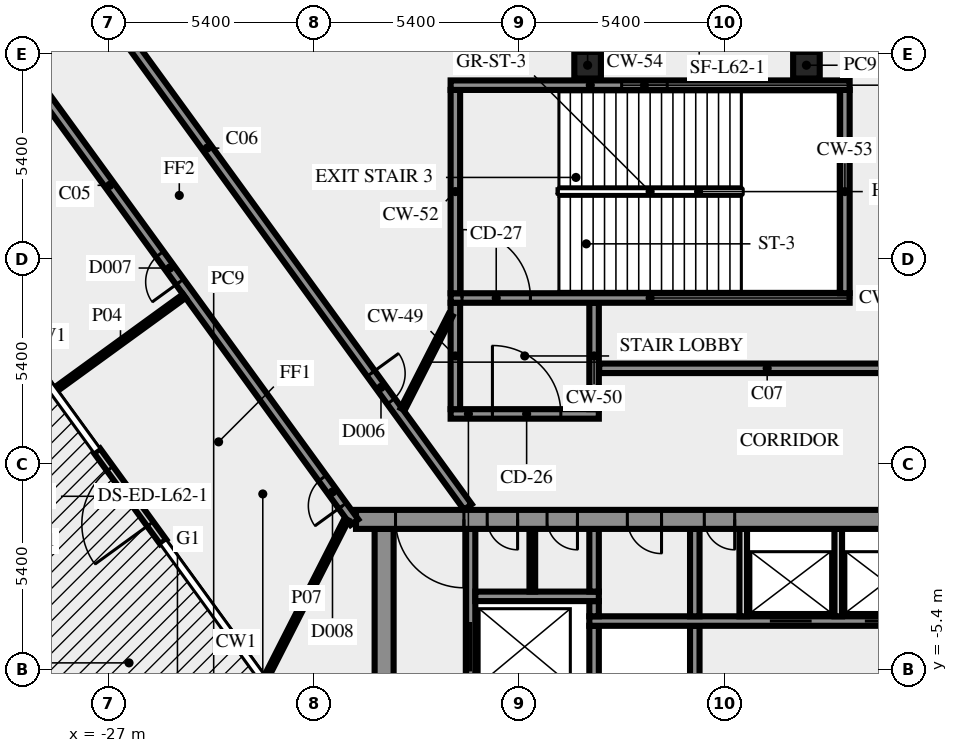
"""IFC4 building model, lengths in metres.
Left out: names, types, materials, properties, quantities, classifications, styles, units other than length and angle.
Written with IfcOpenShell. Run it as: python <this file> out.ifc"""

import sys

from ifc_helpers import new_model, si_unit, direction, frame, frame_2d, origin, origin_2d, place, context, subcontext, project, spatial, rectangle, extrude, element, fill, save


model = new_model("IFC4")
c1 = context("Model", 3, precision=1e-05, world=origin(), true_north=direction((0.0, 1.0)))
c2 = subcontext(c1, "Body", "Model", "MODEL_VIEW")
j1 = project(units=[si_unit("LENGTHUNIT", "METRE"), si_unit("PLANEANGLEUNIT", "RADIAN")], contexts=[c1])
p1 = place(None, origin())
s1 = spatial("IfcSite", under=j1, at=p1, CompositionType="ELEMENT")
p2 = place(p1, origin())
s2 = spatial("IfcBuilding", under=s1, at=p2, CompositionType="ELEMENT")
p3 = place(p2, frame((0.0, 0.0, 265.0)))
s3 = spatial("IfcBuildingStorey", under=s2, at=p3, CompositionType="ELEMENT", Elevation=265.0)
for number, where, z_axis, x_axis in (
    (1, (-8.637, 10.5, 0.0), (0.0, 0.0, 1.0), (-1.0, 0.0, 0.0)),
    (2, (-14.395, 10.5, 0.0), (0.0, 0.0, 1.0), (-1.0, 0.0, 0.0)),
):
    element("IfcColumn", number, at=place(p3, frame(where, z_axis=z_axis, x_axis=x_axis)), inside=s3, PredefinedType="COLUMN", context=c2, shape_type="SweptSolid", body=[
        extrude(rectangle(XDim=0.7, YDim=0.7, at=origin_2d()), origin(), (0.0, 0.0, 1.0), 3.65),
    ])
p4 = place(p3, frame((-25.563, -2.041, 0.0), z_axis=(0.0, 0.0, 1.0), x_axis=(-0.587774760134, 0.809024617271, 0.0)))
e3 = element("IfcWall", 3, at=p4, inside=s3, PredefinedType="SOLIDWALL", context=c2, shape_type="SweptSolid", body=[
    extrude(rectangle(XDim=2.963, YDim=0.2, at=frame_2d((1.481, 0.0))), origin(), (0.0, 0.0, 1.0), 3.65),
])
p5 = place(p4, frame((0.582, 0.0, 0.0)))
e4 = element("IfcOpeningElement", 4, at=p5, cuts=e3, PredefinedType="OPENING", context=c2, shape_type="SweptSolid", body=[
    extrude(rectangle(XDim=1.8, YDim=2.4, at=frame_2d((0.9, 1.2))), frame((0.0, 0.11, 0.0), z_axis=(0.0, -1.0, 0.0), x_axis=(1.0, 0.0, 0.0)), (0.0, 0.0, 1.0), 0.22),
])
p6 = place(p3, frame((-19.75, -10.5, 0.0), z_axis=(0.0, 0.0, 1.0), x_axis=(0.0, 1.0, 0.0)))
e5 = element("IfcWall", 5, at=p6, inside=s3, PredefinedType="SHEAR", context=c2, shape_type="SweptSolid", body=[
    extrude(rectangle(XDim=8.8, YDim=0.5, at=frame_2d((4.4, 0.0))), origin(), (0.0, 0.0, 1.0), 3.65),
])
p7 = place(p3, frame((-17.475, -6.0, 0.0), z_axis=(0.0, 0.0, 1.0), x_axis=(0.0, 1.0, 0.0)))
e6 = element("IfcWall", 6, at=p7, inside=s3, PredefinedType="SHEAR", context=c2, shape_type="SweptSolid", body=[
    extrude(rectangle(XDim=4.3, YDim=0.25, at=frame_2d((2.15, 0.0))), origin(), (0.0, 0.0, 1.0), 3.65),
])
p8 = place(p7, frame((0.55, 0.0, 0.0)))
e7 = element("IfcOpeningElement", 7, at=p8, cuts=e6, PredefinedType="OPENING", context=c2, shape_type="SweptSolid", body=[
    extrude(rectangle(XDim=1.3, YDim=2.1, at=frame_2d((0.65, 1.05))), frame((0.0, 0.135, 0.0), z_axis=(0.0, -1.0, 0.0), x_axis=(1.0, 0.0, 0.0)), (0.0, 0.0, 1.0), 0.27),
])
for number, where, z_axis, x_axis in (
    (8, (-14.225, -6.0, 0.0), (0.0, 0.0, 1.0), (0.0, 1.0, 0.0)),
    (9, (-11.575, -6.0, 0.0), (0.0, 0.0, 1.0), (0.0, 1.0, 0.0)),
):
    element("IfcWall", number, at=place(p3, frame(where, z_axis=z_axis, x_axis=x_axis)), inside=s3, PredefinedType="SHEAR", context=c2, shape_type="SweptSolid", body=[
        extrude(rectangle(XDim=1.75, YDim=0.25, at=frame_2d((0.875, 0.0))), origin(), (0.0, 0.0, 1.0), 3.65),
    ])
p9 = place(p3, frame((-14.35, -4.125, 0.0), z_axis=(0.0, 0.0, 1.0), x_axis=(1.0, 0.0, 0.0)))
e10 = element("IfcWall", 10, at=p9, inside=s3, PredefinedType="SHEAR", context=c2, shape_type="SweptSolid", body=[
    extrude(rectangle(XDim=12.7, YDim=0.25, at=frame_2d((6.35, 0.0))), origin(), (0.0, 0.0, 1.0), 3.65),
])
p10 = place(p9, frame((4.75, 0.0, 0.0)))
e11 = element("IfcOpeningElement", 11, at=p10, cuts=e10, PredefinedType="OPENING", context=c2, shape_type="SweptSolid", body=[
    extrude(rectangle(XDim=1.1, YDim=2.1, at=frame_2d((0.55, 1.05))), frame((0.0, 0.135, 0.0), z_axis=(0.0, -1.0, 0.0), x_axis=(1.0, 0.0, 0.0)), (0.0, 0.0, 1.0), 0.27),
])
p11 = place(p9, frame((7.25, 0.0, 0.0)))
e12 = element("IfcOpeningElement", 12, at=p11, cuts=e10, PredefinedType="OPENING", context=c2, shape_type="SweptSolid", body=[
    extrude(rectangle(XDim=1.1, YDim=2.1, at=frame_2d((0.55, 1.05))), frame((0.0, 0.135, 0.0), z_axis=(0.0, -1.0, 0.0), x_axis=(1.0, 0.0, 0.0)), (0.0, 0.0, 1.0), 0.27),
])
p12 = place(p3, frame((-14.225, -4.0, 0.0), z_axis=(0.0, 0.0, 1.0), x_axis=(0.0, 1.0, 0.0)))
e13 = element("IfcWall", 13, at=p12, inside=s3, PredefinedType="SHEAR", context=c2, shape_type="SweptSolid", body=[
    extrude(rectangle(XDim=0.4, YDim=0.25, at=frame_2d((0.2, 0.0))), origin(), (0.0, 0.0, 1.0), 3.65),
])
p13 = place(p3, frame((-11.575, -4.0, 0.0), z_axis=(0.0, 0.0, 1.0), x_axis=(0.0, 1.0, 0.0)))
e14 = element("IfcWall", 14, at=p13, inside=s3, PredefinedType="SHEAR", context=c2, shape_type="SweptSolid", body=[
    extrude(rectangle(XDim=2.3, YDim=0.25, at=frame_2d((1.15, 0.0))), origin(), (0.0, 0.0, 1.0), 3.65),
])
for number, where, z_axis, x_axis in (
    (15, (-10.3, -4.0, 0.0), (0.0, 0.0, 1.0), (0.0, 1.0, 0.0)),
    (16, (-7.8, -4.0, 0.0), (0.0, 0.0, 1.0), (0.0, 1.0, 0.0)),
):
    element("IfcWall", number, at=place(p3, frame(where, z_axis=z_axis, x_axis=x_axis)), inside=s3, PredefinedType="SOLIDWALL", context=c2, shape_type="SweptSolid", body=[
        extrude(rectangle(XDim=2.3, YDim=0.2, at=frame_2d((1.15, 0.0))), origin(), (0.0, 0.0, 1.0), 3.65),
    ])
p14 = place(p3, frame((-17.35, -3.475, 0.0), z_axis=(0.0, 0.0, 1.0), x_axis=(1.0, 0.0, 0.0)))
e17 = element("IfcWall", 17, at=p14, inside=s3, PredefinedType="SHEAR", context=c2, shape_type="SweptSolid", body=[
    extrude(rectangle(XDim=3.25, YDim=0.25, at=frame_2d((1.625, 0.0))), origin(), (0.0, 0.0, 1.0), 3.65),
])
p15 = place(p3, frame((-15.85, -3.35, 0.0), z_axis=(0.0, 0.0, 1.0), x_axis=(0.0, 1.0, 0.0)))
e18 = element("IfcWall", 18, at=p15, inside=s3, PredefinedType="PARTITIONING", context=c2, shape_type="SweptSolid", body=[
    extrude(rectangle(XDim=1.65, YDim=0.15, at=frame_2d((0.825, 0.0))), origin(), (0.0, 0.0, 1.0), 3.65),
])
p16 = place(p3, frame((-14.225, -3.35, 0.0), z_axis=(0.0, 0.0, 1.0), x_axis=(0.0, 1.0, 0.0)))
e19 = element("IfcWall", 19, at=p16, inside=s3, PredefinedType="SHEAR", context=c2, shape_type="SweptSolid", body=[
    extrude(rectangle(XDim=1.65, YDim=0.25, at=frame_2d((0.825, 0.0))), origin(), (0.0, 0.0, 1.0), 3.65),
])
p17 = place(p3, frame((20.49, -1.45, 0.0), z_axis=(0.0, 0.0, 1.0), x_axis=(-1.0, 0.0, 0.0)))
e20 = element("IfcWall", 20, at=p17, inside=s3, PredefinedType="SHEAR", context=c2, shape_type="SweptSolid", body=[
    extrude(rectangle(XDim=40.98, YDim=0.5, at=frame_2d((20.49, 0.0))), origin(), (0.0, 0.0, 1.0), 3.65),
])
p18 = place(p17, frame((38.14, 0.0, 0.0)))
e21 = element("IfcOpeningElement", 21, at=p18, cuts=e20, PredefinedType="OPENING", context=c2, shape_type="SweptSolid", body=[
    extrude(rectangle(XDim=1.8, YDim=2.1, at=frame_2d((0.9, 1.05))), frame((0.0, 0.26, 0.0), z_axis=(0.0, -1.0, 0.0), x_axis=(1.0, 0.0, 0.0)), (0.0, 0.0, 1.0), 0.52),
])
p19 = place(p17, frame((36.728, 0.0, 0.0)))
e22 = element("IfcOpeningElement", 22, at=p19, cuts=e20, PredefinedType="OPENING", context=c2, shape_type="SweptSolid", body=[
    extrude(rectangle(XDim=0.8, YDim=2.1, at=frame_2d((0.4, 1.05))), frame((0.0, 0.26, 0.0), z_axis=(0.0, -1.0, 0.0), x_axis=(1.0, 0.0, 0.0)), (0.0, 0.0, 1.0), 0.52),
])
p20 = place(p17, frame((35.153, 0.0, 0.0)))
e23 = element("IfcOpeningElement", 23, at=p20, cuts=e20, PredefinedType="OPENING", context=c2, shape_type="SweptSolid", body=[
    extrude(rectangle(XDim=0.8, YDim=2.1, at=frame_2d((0.4, 1.05))), frame((0.0, 0.26, 0.0), z_axis=(0.0, -1.0, 0.0), x_axis=(1.0, 0.0, 0.0)), (0.0, 0.0, 1.0), 0.52),
])
p21 = place(p17, frame((32.94, 0.0, 0.0)))
e24 = element("IfcOpeningElement", 24, at=p21, cuts=e20, PredefinedType="OPENING", context=c2, shape_type="SweptSolid", body=[
    extrude(rectangle(XDim=0.9, YDim=2.1, at=frame_2d((0.45, 1.05))), frame((0.0, 0.26, 0.0), z_axis=(0.0, -1.0, 0.0), x_axis=(1.0, 0.0, 0.0)), (0.0, 0.0, 1.0), 0.52),
])
p22 = place(p17, frame((31.015, 0.0, 0.0)))
e25 = element("IfcOpeningElement", 25, at=p22, cuts=e20, PredefinedType="OPENING", context=c2, shape_type="SweptSolid", body=[
    extrude(rectangle(XDim=0.8, YDim=2.1, at=frame_2d((0.4, 1.05))), frame((0.0, 0.26, 0.0), z_axis=(0.0, -1.0, 0.0), x_axis=(1.0, 0.0, 0.0)), (0.0, 0.0, 1.0), 0.52),
])
p23 = place(p17, frame((24.765, 0.0, 0.0)))
e26 = element("IfcOpeningElement", 26, at=p23, cuts=e20, PredefinedType="OPENING", context=c2, shape_type="SweptSolid", body=[
    extrude(rectangle(XDim=0.8, YDim=2.1, at=frame_2d((0.4, 1.05))), frame((0.0, 0.26, 0.0), z_axis=(0.0, -1.0, 0.0), x_axis=(1.0, 0.0, 0.0)), (0.0, 0.0, 1.0), 0.52),
])
p24 = place(p17, frame((19.59, 0.0, 0.0)))
e27 = element("IfcOpeningElement", 27, at=p24, cuts=e20, PredefinedType="OPENING", context=c2, shape_type="SweptSolid", body=[
    extrude(rectangle(XDim=2.0, YDim=2.1, at=frame_2d((1.0, 1.05))), frame((0.0, 0.26, 0.0), z_axis=(0.0, -1.0, 0.0), x_axis=(1.0, 0.0, 0.0)), (0.0, 0.0, 1.0), 0.52),
])
p25 = place(p17, frame((13.202, 0.0, 0.0)))
e28 = element("IfcOpeningElement", 28, at=p25, cuts=e20, PredefinedType="OPENING", context=c2, shape_type="SweptSolid", body=[
    extrude(rectangle(XDim=0.9, YDim=2.1, at=frame_2d((0.45, 1.05))), frame((0.0, 0.26, 0.0), z_axis=(0.0, -1.0, 0.0), x_axis=(1.0, 0.0, 0.0)), (0.0, 0.0, 1.0), 0.52),
])
p26 = place(p17, frame((9.478, 0.0, 0.0)))
e29 = element("IfcOpeningElement", 29, at=p26, cuts=e20, PredefinedType="OPENING", context=c2, shape_type="SweptSolid", body=[
    extrude(rectangle(XDim=0.9, YDim=2.1, at=frame_2d((0.45, 1.05))), frame((0.0, 0.26, 0.0), z_axis=(0.0, -1.0, 0.0), x_axis=(1.0, 0.0, 0.0)), (0.0, 0.0, 1.0), 0.52),
])
p27 = place(p17, frame((7.14, 0.0, 0.0)))
e30 = element("IfcOpeningElement", 30, at=p27, cuts=e20, PredefinedType="OPENING", context=c2, shape_type="SweptSolid", body=[
    extrude(rectangle(XDim=0.9, YDim=2.1, at=frame_2d((0.45, 1.05))), frame((0.0, 0.26, 0.0), z_axis=(0.0, -1.0, 0.0), x_axis=(1.0, 0.0, 0.0)), (0.0, 0.0, 1.0), 0.52),
])
p28 = place(p17, frame((4.19, 0.0, 0.0)))
e31 = element("IfcOpeningElement", 31, at=p28, cuts=e20, PredefinedType="OPENING", context=c2, shape_type="SweptSolid", body=[
    extrude(rectangle(XDim=0.9, YDim=2.1, at=frame_2d((0.45, 1.05))), frame((0.0, 0.26, 0.0), z_axis=(0.0, -1.0, 0.0), x_axis=(1.0, 0.0, 0.0)), (0.0, 0.0, 1.0), 0.52),
])
p29 = place(p17, frame((1.04, 0.0, 0.0)))
e32 = element("IfcOpeningElement", 32, at=p29, cuts=e20, PredefinedType="OPENING", context=c2, shape_type="SweptSolid", body=[
    extrude(rectangle(XDim=1.8, YDim=2.1, at=frame_2d((0.9, 1.05))), frame((0.0, 0.26, 0.0), z_axis=(0.0, -1.0, 0.0), x_axis=(1.0, 0.0, 0.0)), (0.0, 0.0, 1.0), 0.52),
])
p30 = place(p3, frame((-18.0, 1.325, 0.0), z_axis=(0.0, 0.0, 1.0), x_axis=(1.0, 0.0, 0.0)))
e33 = element("IfcWall", 33, at=p30, inside=s3, PredefinedType="SHEAR", context=c2, shape_type="SweptSolid", body=[
    extrude(rectangle(XDim=3.9, YDim=0.25, at=frame_2d((1.95, 0.0))), origin(), (0.0, 0.0, 1.0), 3.65),
])
p31 = place(p30, frame((1.1, 0.0, 0.0)))
e34 = element("IfcOpeningElement", 34, at=p31, cuts=e33, PredefinedType="OPENING", context=c2, shape_type="SweptSolid", body=[
    extrude(rectangle(XDim=1.8, YDim=2.1, at=frame_2d((0.9, 1.05))), frame((0.0, 0.135, 0.0), z_axis=(0.0, -1.0, 0.0), x_axis=(1.0, 0.0, 0.0)), (0.0, 0.0, 1.0), 0.27),
])
for number, where, z_axis, x_axis in (
    (35, (-17.875, 1.45, 0.0), (0.0, 0.0, 1.0), (0.0, 1.0, 0.0)),
    (36, (-14.225, 1.45, 0.0), (0.0, 0.0, 1.0), (0.0, 1.0, 0.0)),
):
    element("IfcWall", number, at=place(p3, frame(where, z_axis=z_axis, x_axis=x_axis)), inside=s3, PredefinedType="SHEAR", context=c2, shape_type="SweptSolid", body=[
        extrude(rectangle(XDim=2.8, YDim=0.25, at=frame_2d((1.4, 0.0))), origin(), (0.0, 0.0, 1.0), 3.65),
    ])
p32 = place(p3, frame((-18.0, 4.375, 0.0), z_axis=(0.0, 0.0, 1.0), x_axis=(1.0, 0.0, 0.0)))
e37 = element("IfcWall", 37, at=p32, inside=s3, PredefinedType="SHEAR", context=c2, shape_type="SweptSolid", body=[
    extrude(rectangle(XDim=10.5, YDim=0.25, at=frame_2d((5.25, 0.0))), origin(), (0.0, 0.0, 1.0), 3.65),
])
p33 = place(p32, frame((0.3, 0.0, 0.0)))
e38 = element("IfcOpeningElement", 38, at=p33, cuts=e37, PredefinedType="OPENING", context=c2, shape_type="SweptSolid", body=[
    extrude(rectangle(XDim=1.8, YDim=2.1, at=frame_2d((0.9, 1.05))), frame((0.0, 0.135, 0.0), z_axis=(0.0, -1.0, 0.0), x_axis=(1.0, 0.0, 0.0)), (0.0, 0.0, 1.0), 0.27),
])
for number, where, z_axis, x_axis in (
    (39, (-17.875, 4.5, 0.0), (0.0, 0.0, 1.0), (0.0, 1.0, 0.0)),
    (40, (-7.625, 4.5, 0.0), (0.0, 0.0, 1.0), (0.0, 1.0, 0.0)),
):
    element("IfcWall", number, at=place(p3, frame(where, z_axis=z_axis, x_axis=x_axis)), inside=s3, PredefinedType="SHEAR", context=c2, shape_type="SweptSolid", body=[
        extrude(rectangle(XDim=5.35, YDim=0.25, at=frame_2d((2.675, 0.0))), origin(), (0.0, 0.0, 1.0), 3.65),
    ])
p34 = place(p3, frame((-18.0, 9.975, 0.0), z_axis=(0.0, 0.0, 1.0), x_axis=(1.0, 0.0, 0.0)))
e41 = element("IfcWall", 41, at=p34, inside=s3, PredefinedType="SHEAR", context=c2, shape_type="SweptSolid", body=[
    extrude(rectangle(XDim=10.5, YDim=0.25, at=frame_2d((5.25, 0.0))), origin(), (0.0, 0.0, 1.0), 3.65),
])
p35 = place(p34, frame((4.5, 0.0, 1.0)))
e42 = element("IfcOpeningElement", 42, at=p35, cuts=e41, PredefinedType="OPENING", context=c2, shape_type="SweptSolid", body=[
    extrude(rectangle(XDim=1.2, YDim=1.2, at=frame_2d((0.6, 0.6))), frame((0.0, 0.135, 0.0), z_axis=(0.0, -1.0, 0.0), x_axis=(1.0, 0.0, 0.0)), (0.0, 0.0, 1.0), 0.27),
])
p36 = place(p3, frame((-20.531, -1.523, 0.0), z_axis=(0.0, 0.0, 1.0), x_axis=(-0.587786711753, 0.809015934013, 0.0)))
e43 = element("IfcWall", 43, at=p36, inside=s3, PredefinedType="SOLIDWALL", context=c2, shape_type="SweptSolid", body=[
    extrude(rectangle(XDim=21.911, YDim=0.25, at=frame_2d((10.956, 0.0))), origin(), (0.0, 0.0, 1.0), 3.65),
])
p37 = place(p36, frame((0.533, 0.0, 0.0)))
e44 = element("IfcOpeningElement", 44, at=p37, cuts=e43, PredefinedType="OPENING", context=c2, shape_type="SweptSolid", body=[
    extrude(rectangle(XDim=0.9, YDim=2.1, at=frame_2d((0.45, 1.05))), frame((0.0, 0.135, 0.0), z_axis=(0.0, -1.0, 0.0), x_axis=(1.0, 0.0, 0.0)), (0.0, 0.0, 1.0), 0.27),
])
p38 = place(p36, frame((7.816, 0.0, 0.0)))
e45 = element("IfcOpeningElement", 45, at=p38, cuts=e43, PredefinedType="OPENING", context=c2, shape_type="SweptSolid", body=[
    extrude(rectangle(XDim=0.9, YDim=2.1, at=frame_2d((0.45, 1.05))), frame((0.0, 0.135, 0.0), z_axis=(0.0, -1.0, 0.0), x_axis=(1.0, 0.0, 0.0)), (0.0, 0.0, 1.0), 0.27),
])
p39 = place(p3, frame((-31.267, 17.762, 0.0), z_axis=(0.0, 0.0, 1.0), x_axis=(0.587787966774, -0.809015022181, 0.0)))
e46 = element("IfcWall", 46, at=p39, inside=s3, PredefinedType="SOLIDWALL", context=c2, shape_type="SweptSolid", body=[
    extrude(rectangle(XDim=23.345, YDim=0.25, at=frame_2d((11.672, 0.0))), origin(), (0.0, 0.0, 1.0), 3.65),
])
p40 = place(p39, frame((19.004, 0.0, 0.0)))
e47 = element("IfcOpeningElement", 47, at=p40, cuts=e46, PredefinedType="OPENING", context=c2, shape_type="SweptSolid", body=[
    extrude(rectangle(XDim=0.9, YDim=2.1, at=frame_2d((0.45, 1.05))), frame((0.0, 0.135, 0.0), z_axis=(0.0, -1.0, 0.0), x_axis=(1.0, 0.0, 0.0)), (0.0, 0.0, 1.0), 0.27),
])
p41 = place(p3, frame((-14.09, 2.525, 0.0), z_axis=(0.0, 0.0, 1.0), x_axis=(1.0, 0.0, 0.0)))
e48 = element("IfcWall", 48, at=p41, inside=s3, PredefinedType="SOLIDWALL", context=c2, shape_type="SweptSolid", body=[
    extrude(rectangle(XDim=8.84, YDim=0.25, at=frame_2d((4.42, 0.0))), origin(), (0.0, 0.0, 1.0), 3.65),
])
p42 = place(p3, frame((-25.008, 4.427, 0.0), z_axis=(0.0, 0.0, 1.0), x_axis=(-0.809020893444, -0.587779885646, 0.0)))
e49 = element("IfcWall", 49, at=p42, inside=s3, PredefinedType="PARTITIONING", context=c2, shape_type="SweptSolid", body=[
    extrude(rectangle(XDim=4.15, YDim=0.12, at=frame_2d((2.075, 0.0))), origin(), (0.0, 0.0, 1.0), 3.65),
])
p43 = place(p3, frame((-19.261, 1.45, 0.0), z_axis=(0.0, 0.0, 1.0), x_axis=(0.453950796792, 0.891026752736, 0.0)))
e50 = element("IfcWall", 50, at=p43, inside=s3, PredefinedType="PARTITIONING", context=c2, shape_type="SweptSolid", body=[
    extrude(rectangle(XDim=2.778, YDim=0.12, at=frame_2d((1.389, 0.0))), origin(), (0.0, 0.0, 1.0), 3.65),
])
p44 = place(p3, frame((-22.84, -5.574, 0.0), z_axis=(0.0, 0.0, 1.0), x_axis=(0.453931312426, 0.891036679155, 0.0)))
e51 = element("IfcWall", 51, at=p44, inside=s3, PredefinedType="PARTITIONING", context=c2, shape_type="SweptSolid", body=[
    extrude(rectangle(XDim=4.629, YDim=0.12, at=frame_2d((2.314, 0.0))), origin(), (0.0, 0.0, 1.0), 3.65),
])
p45 = place(p5, origin())
e52 = element("IfcDoor", 52, at=p45, inside=s3, OperationType="DOUBLE_DOOR_SINGLE_SWING", PredefinedType="DOOR", context=c2, shape_type="SweptSolid", body=[
    extrude(rectangle(XDim=1.8, YDim=2.4, at=frame_2d((0.9, 1.2))), frame((0.0, 0.025, 0.0), z_axis=(0.0, -1.0, 0.0), x_axis=(1.0, 0.0, 0.0)), (0.0, 0.0, 1.0), 0.05),
])
fill(e4, e52)
p46 = place(p8, origin())
e53 = element("IfcDoor", 53, at=p46, inside=s3, OperationType="DOUBLE_DOOR_SLIDING", PredefinedType="DOOR", context=c2, shape_type="SweptSolid", body=[
    extrude(rectangle(XDim=1.3, YDim=2.1, at=frame_2d((0.65, 1.05))), frame((0.0, 0.025, 0.0), z_axis=(0.0, -1.0, 0.0), x_axis=(1.0, 0.0, 0.0)), (0.0, 0.0, 1.0), 0.05),
])
fill(e7, e53)
p47 = place(p10, origin())
e54 = element("IfcDoor", 54, at=p47, inside=s3, OperationType="DOUBLE_DOOR_SLIDING", PredefinedType="DOOR", context=c2, shape_type="SweptSolid", body=[
    extrude(rectangle(XDim=1.1, YDim=2.1, at=frame_2d((0.55, 1.05))), frame((0.0, 0.025, 0.0), z_axis=(0.0, -1.0, 0.0), x_axis=(1.0, 0.0, 0.0)), (0.0, 0.0, 1.0), 0.05),
])
fill(e11, e54)
p48 = place(p11, origin())
e55 = element("IfcDoor", 55, at=p48, inside=s3, OperationType="DOUBLE_DOOR_SLIDING", PredefinedType="DOOR", context=c2, shape_type="SweptSolid", body=[
    extrude(rectangle(XDim=1.1, YDim=2.1, at=frame_2d((0.55, 1.05))), frame((0.0, 0.025, 0.0), z_axis=(0.0, -1.0, 0.0), x_axis=(1.0, 0.0, 0.0)), (0.0, 0.0, 1.0), 0.05),
])
fill(e12, e55)
p49 = place(p18, origin())
e56 = element("IfcDoor", 56, at=p49, inside=s3, OperationType="DOUBLE_DOOR_SINGLE_SWING", PredefinedType="DOOR", context=c2, shape_type="SweptSolid", body=[
    extrude(rectangle(XDim=1.8, YDim=2.1, at=frame_2d((0.9, 1.05))), frame((0.0, 0.025, 0.0), z_axis=(0.0, -1.0, 0.0), x_axis=(1.0, 0.0, 0.0)), (0.0, 0.0, 1.0), 0.05),
])
fill(e21, e56)
p50 = place(p19, origin())
e57 = element("IfcDoor", 57, at=p50, inside=s3, OperationType="SINGLE_SWING_RIGHT", PredefinedType="DOOR", context=c2, shape_type="SweptSolid", body=[
    extrude(rectangle(XDim=0.8, YDim=2.1, at=frame_2d((0.4, 1.05))), frame((0.0, 0.025, 0.0), z_axis=(0.0, -1.0, 0.0), x_axis=(1.0, 0.0, 0.0)), (0.0, 0.0, 1.0), 0.05),
])
fill(e22, e57)
p51 = place(p20, origin())
e58 = element("IfcDoor", 58, at=p51, inside=s3, OperationType="SINGLE_SWING_RIGHT", PredefinedType="DOOR", context=c2, shape_type="SweptSolid", body=[
    extrude(rectangle(XDim=0.8, YDim=2.1, at=frame_2d((0.4, 1.05))), frame((0.0, 0.025, 0.0), z_axis=(0.0, -1.0, 0.0), x_axis=(1.0, 0.0, 0.0)), (0.0, 0.0, 1.0), 0.05),
])
fill(e23, e58)
p52 = place(p21, origin())
e59 = element("IfcDoor", 59, at=p52, inside=s3, OperationType="SINGLE_SWING_RIGHT", PredefinedType="DOOR", context=c2, shape_type="SweptSolid", body=[
    extrude(rectangle(XDim=0.9, YDim=2.1, at=frame_2d((0.45, 1.05))), frame((0.0, 0.025, 0.0), z_axis=(0.0, -1.0, 0.0), x_axis=(1.0, 0.0, 0.0)), (0.0, 0.0, 1.0), 0.05),
])
fill(e24, e59)
p53 = place(p22, origin())
e60 = element("IfcDoor", 60, at=p53, inside=s3, OperationType="SINGLE_SWING_RIGHT", PredefinedType="DOOR", context=c2, shape_type="SweptSolid", body=[
    extrude(rectangle(XDim=0.8, YDim=2.1, at=frame_2d((0.4, 1.05))), frame((0.0, 0.025, 0.0), z_axis=(0.0, -1.0, 0.0), x_axis=(1.0, 0.0, 0.0)), (0.0, 0.0, 1.0), 0.05),
])
fill(e25, e60)
p54 = place(p31, origin())
e61 = element("IfcDoor", 61, at=p54, inside=s3, OperationType="DOUBLE_DOOR_SINGLE_SWING", PredefinedType="DOOR", context=c2, shape_type="SweptSolid", body=[
    extrude(rectangle(XDim=1.8, YDim=2.1, at=frame_2d((0.9, 1.05))), frame((0.0, 0.025, 0.0), z_axis=(0.0, -1.0, 0.0), x_axis=(1.0, 0.0, 0.0)), (0.0, 0.0, 1.0), 0.05),
])
fill(e34, e61)
p55 = place(p33, origin())
e62 = element("IfcDoor", 62, at=p55, inside=s3, OperationType="DOUBLE_DOOR_SINGLE_SWING", PredefinedType="DOOR", context=c2, shape_type="SweptSolid", body=[
    extrude(rectangle(XDim=1.8, YDim=2.1, at=frame_2d((0.9, 1.05))), frame((0.0, 0.025, 0.0), z_axis=(0.0, -1.0, 0.0), x_axis=(1.0, 0.0, 0.0)), (0.0, 0.0, 1.0), 0.05),
])
fill(e38, e62)
p56 = place(p35, origin())
e63 = element("IfcWindow", 63, at=p56, inside=s3, PartitioningType="SINGLE_PANEL", PredefinedType="WINDOW", context=c2, shape_type="SweptSolid", body=[
    extrude(rectangle(XDim=1.2, YDim=1.2, at=frame_2d((0.6, 0.6))), frame((0.0, 0.03, 0.0), z_axis=(0.0, -1.0, 0.0), x_axis=(1.0, 0.0, 0.0)), (0.0, 0.0, 1.0), 0.06),
])
fill(e42, e63)
p57 = place(p40, origin())
e64 = element("IfcDoor", 64, at=p57, inside=s3, OperationType="SINGLE_SWING_RIGHT", PredefinedType="DOOR", context=c2, shape_type="SweptSolid", body=[
    extrude(rectangle(XDim=0.9, YDim=2.1, at=frame_2d((0.45, 1.05))), frame((0.0, 0.025, 0.0), z_axis=(0.0, -1.0, 0.0), x_axis=(1.0, 0.0, 0.0)), (0.0, 0.0, 1.0), 0.05),
])
fill(e47, e64)
p58 = place(p37, origin())
e65 = element("IfcDoor", 65, at=p58, inside=s3, OperationType="SINGLE_SWING_LEFT", PredefinedType="DOOR", context=c2, shape_type="SweptSolid", body=[
    extrude(rectangle(XDim=0.9, YDim=2.1, at=frame_2d((0.45, 1.05))), frame((0.0, 0.025, 0.0), z_axis=(0.0, -1.0, 0.0), x_axis=(1.0, 0.0, 0.0)), (0.0, 0.0, 1.0), 0.05),
])
fill(e44, e65)
p59 = place(p38, origin())
e66 = element("IfcDoor", 66, at=p59, inside=s3, OperationType="SINGLE_SWING_LEFT", PredefinedType="DOOR", context=c2, shape_type="SweptSolid", body=[
    extrude(rectangle(XDim=0.9, YDim=2.1, at=frame_2d((0.45, 1.05))), frame((0.0, 0.025, 0.0), z_axis=(0.0, -1.0, 0.0), x_axis=(1.0, 0.0, 0.0)), (0.0, 0.0, 1.0), 0.05),
])
fill(e45, e66)
save(model, sys.argv[1])
